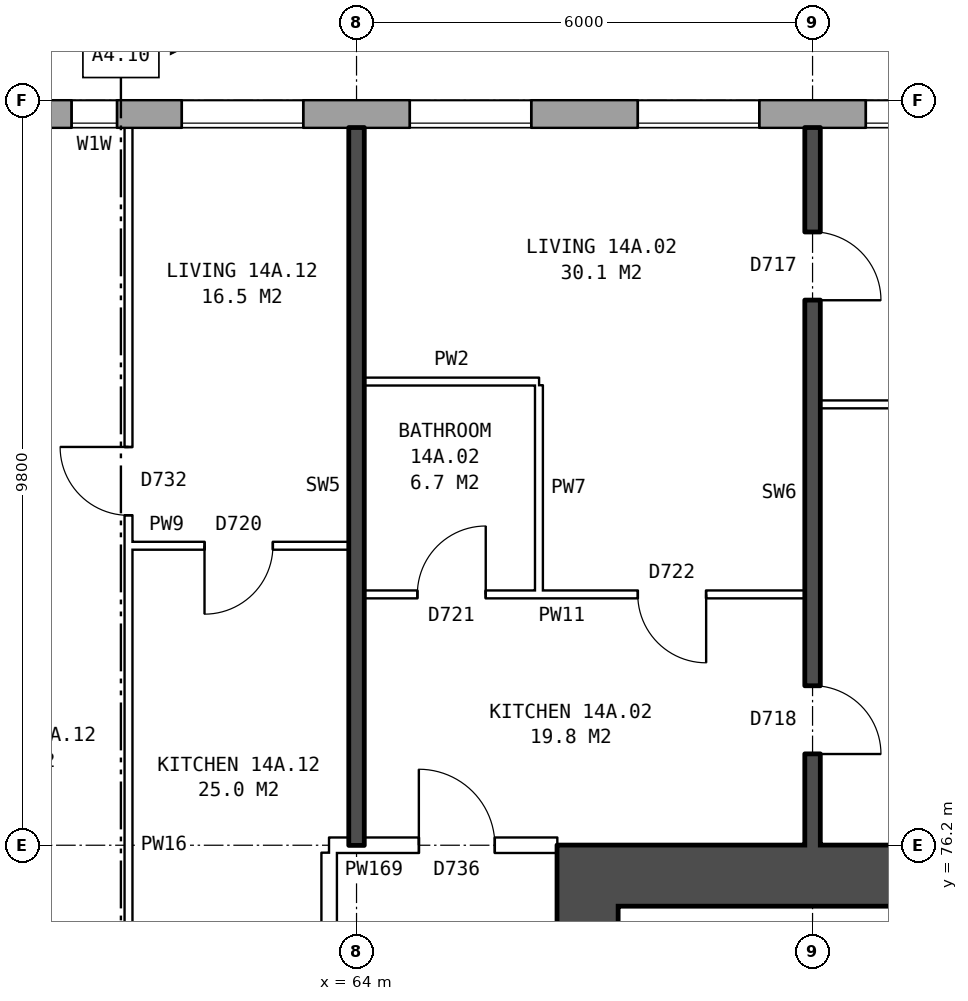
"""IFC4 building model, lengths in metres.
Left out: names, types, materials, properties, quantities, classifications, styles, units other than length and angle.
Written with IfcOpenShell. Run it as: python <this file> out.ifc"""

import sys

from ifc_helpers import new_model, si_unit, direction, frame, frame_2d, origin, place, context, subcontext, project, spatial, rectangle, extrude, element, fill, save


model = new_model("IFC4")
c1 = context("Model", 3, precision=1e-05, world=origin(), true_north=direction((0.0, 1.0)))
c2 = subcontext(c1, "Body", "Model", "MODEL_VIEW")
j1 = project(units=[si_unit("LENGTHUNIT", "METRE"), si_unit("PLANEANGLEUNIT", "RADIAN")], contexts=[c1])
p1 = place(None, origin())
s1 = spatial("IfcSite", under=j1, at=p1, CompositionType="ELEMENT")
p2 = place(p1, origin())
s2 = spatial("IfcBuilding", under=s1, at=p2, CompositionType="ELEMENT")
p3 = place(p2, frame((0.0, 0.0, 53.6)))
s3 = spatial("IfcBuildingStorey", under=s2, at=p3, CompositionType="ELEMENT", Elevation=53.6)
p4 = place(p3, frame((72.925, 85.82, 0.0), z_axis=(0.0, 0.0, 1.0), x_axis=(-1.0, 0.0, 0.0)))
e1 = element("IfcWall", 1, at=p4, inside=s3, PredefinedType="STANDARD", context=c2, shape_type="SweptSolid", body=[
    extrude(rectangle(XDim=48.351, YDim=0.36, at=frame_2d((24.175, 0.0))), origin(), (0.0, 0.0, 1.0), 2.85),
])
p5 = place(p4, frame((0.625, 0.0, 0.8)))
e2 = element("IfcOpeningElement", 2, at=p5, cuts=e1, PredefinedType="OPENING", context=c2, shape_type="SweptSolid", body=[
    extrude(rectangle(XDim=1.6, YDim=1.8, at=frame_2d((0.8, 0.9))), frame((0.0, 0.19, 0.0), z_axis=(0.0, -1.0, 0.0), x_axis=(1.0, 0.0, 0.0)), (0.0, 0.0, 1.0), 0.38),
])
p6 = place(p4, frame((3.625, 0.0, 0.8)))
e3 = element("IfcOpeningElement", 3, at=p6, cuts=e1, PredefinedType="OPENING", context=c2, shape_type="SweptSolid", body=[
    extrude(rectangle(XDim=1.6, YDim=1.8, at=frame_2d((0.8, 0.9))), frame((0.0, 0.19, 0.0), z_axis=(0.0, -1.0, 0.0), x_axis=(1.0, 0.0, 0.0)), (0.0, 0.0, 1.0), 0.38),
])
p7 = place(p4, frame((6.625, 0.0, 0.8)))
e4 = element("IfcOpeningElement", 4, at=p7, cuts=e1, PredefinedType="OPENING", context=c2, shape_type="SweptSolid", body=[
    extrude(rectangle(XDim=1.6, YDim=1.8, at=frame_2d((0.8, 0.9))), frame((0.0, 0.19, 0.0), z_axis=(0.0, -1.0, 0.0), x_axis=(1.0, 0.0, 0.0)), (0.0, 0.0, 1.0), 0.38),
])
p8 = place(p4, frame((9.625, 0.0, 0.8)))
e5 = element("IfcOpeningElement", 5, at=p8, cuts=e1, PredefinedType="OPENING", context=c2, shape_type="SweptSolid", body=[
    extrude(rectangle(XDim=1.6, YDim=1.8, at=frame_2d((0.8, 0.9))), frame((0.0, 0.19, 0.0), z_axis=(0.0, -1.0, 0.0), x_axis=(1.0, 0.0, 0.0)), (0.0, 0.0, 1.0), 0.38),
])
p9 = place(p4, frame((12.075, 0.0, 1.55)))
e6 = element("IfcOpeningElement", 6, at=p9, cuts=e1, PredefinedType="OPENING", context=c2, shape_type="SweptSolid", body=[
    extrude(rectangle(XDim=0.6, YDim=0.9, at=frame_2d((0.3, 0.45))), frame((0.0, 0.19, 0.0), z_axis=(0.0, -1.0, 0.0), x_axis=(1.0, 0.0, 0.0)), (0.0, 0.0, 1.0), 0.38),
])
p10 = place(p4, frame((15.625, 0.0, 0.8)))
e7 = element("IfcOpeningElement", 7, at=p10, cuts=e1, PredefinedType="OPENING", context=c2, shape_type="SweptSolid", body=[
    extrude(rectangle(XDim=1.6, YDim=1.8, at=frame_2d((0.8, 0.9))), frame((0.0, 0.19, 0.0), z_axis=(0.0, -1.0, 0.0), x_axis=(1.0, 0.0, 0.0)), (0.0, 0.0, 1.0), 0.38),
])
p11 = place(p4, frame((18.625, 0.0, 0.8)))
e8 = element("IfcOpeningElement", 8, at=p11, cuts=e1, PredefinedType="OPENING", context=c2, shape_type="SweptSolid", body=[
    extrude(rectangle(XDim=1.6, YDim=1.8, at=frame_2d((0.8, 0.9))), frame((0.0, 0.19, 0.0), z_axis=(0.0, -1.0, 0.0), x_axis=(1.0, 0.0, 0.0)), (0.0, 0.0, 1.0), 0.38),
])
p12 = place(p4, frame((21.625, 0.0, 0.8)))
e9 = element("IfcOpeningElement", 9, at=p12, cuts=e1, PredefinedType="OPENING", context=c2, shape_type="SweptSolid", body=[
    extrude(rectangle(XDim=1.6, YDim=1.8, at=frame_2d((0.8, 0.9))), frame((0.0, 0.19, 0.0), z_axis=(0.0, -1.0, 0.0), x_axis=(1.0, 0.0, 0.0)), (0.0, 0.0, 1.0), 0.38),
])
p13 = place(p4, frame((24.625, 0.0, 0.8)))
e10 = element("IfcOpeningElement", 10, at=p13, cuts=e1, PredefinedType="OPENING", context=c2, shape_type="SweptSolid", body=[
    extrude(rectangle(XDim=1.6, YDim=1.8, at=frame_2d((0.8, 0.9))), frame((0.0, 0.19, 0.0), z_axis=(0.0, -1.0, 0.0), x_axis=(1.0, 0.0, 0.0)), (0.0, 0.0, 1.0), 0.38),
])
p14 = place(p4, frame((27.625, 0.0, 0.8)))
e11 = element("IfcOpeningElement", 11, at=p14, cuts=e1, PredefinedType="OPENING", context=c2, shape_type="SweptSolid", body=[
    extrude(rectangle(XDim=1.6, YDim=1.8, at=frame_2d((0.8, 0.9))), frame((0.0, 0.19, 0.0), z_axis=(0.0, -1.0, 0.0), x_axis=(1.0, 0.0, 0.0)), (0.0, 0.0, 1.0), 0.38),
])
p15 = place(p4, frame((30.625, 0.0, 0.8)))
e12 = element("IfcOpeningElement", 12, at=p15, cuts=e1, PredefinedType="OPENING", context=c2, shape_type="SweptSolid", body=[
    extrude(rectangle(XDim=1.6, YDim=1.8, at=frame_2d((0.8, 0.9))), frame((0.0, 0.19, 0.0), z_axis=(0.0, -1.0, 0.0), x_axis=(1.0, 0.0, 0.0)), (0.0, 0.0, 1.0), 0.38),
])
p16 = place(p4, frame((33.125, 0.0, 0.25)))
e13 = element("IfcOpeningElement", 13, at=p16, cuts=e1, PredefinedType="OPENING", context=c2, shape_type="SweptSolid", body=[
    extrude(rectangle(XDim=0.8, YDim=1.5, at=frame_2d((0.4, 0.75))), frame((0.0, 0.19, 0.0), z_axis=(0.0, -1.0, 0.0), x_axis=(1.0, 0.0, 0.0)), (0.0, 0.0, 1.0), 0.38),
])
p17 = place(p4, frame((36.625, 0.0, 0.8)))
e14 = element("IfcOpeningElement", 14, at=p17, cuts=e1, PredefinedType="OPENING", context=c2, shape_type="SweptSolid", body=[
    extrude(rectangle(XDim=1.6, YDim=1.8, at=frame_2d((0.8, 0.9))), frame((0.0, 0.19, 0.0), z_axis=(0.0, -1.0, 0.0), x_axis=(1.0, 0.0, 0.0)), (0.0, 0.0, 1.0), 0.38),
])
p18 = place(p4, frame((39.625, 0.0, 0.8)))
e15 = element("IfcOpeningElement", 15, at=p18, cuts=e1, PredefinedType="OPENING", context=c2, shape_type="SweptSolid", body=[
    extrude(rectangle(XDim=1.6, YDim=1.8, at=frame_2d((0.8, 0.9))), frame((0.0, 0.19, 0.0), z_axis=(0.0, -1.0, 0.0), x_axis=(1.0, 0.0, 0.0)), (0.0, 0.0, 1.0), 0.38),
])
p19 = place(p4, frame((42.625, 0.0, 0.8)))
e16 = element("IfcOpeningElement", 16, at=p19, cuts=e1, PredefinedType="OPENING", context=c2, shape_type="SweptSolid", body=[
    extrude(rectangle(XDim=1.6, YDim=1.8, at=frame_2d((0.8, 0.9))), frame((0.0, 0.19, 0.0), z_axis=(0.0, -1.0, 0.0), x_axis=(1.0, 0.0, 0.0)), (0.0, 0.0, 1.0), 0.38),
])
p20 = place(p4, frame((45.625, 0.0, 0.8)))
e17 = element("IfcOpeningElement", 17, at=p20, cuts=e1, PredefinedType="OPENING", context=c2, shape_type="SweptSolid", body=[
    extrude(rectangle(XDim=1.6, YDim=1.8, at=frame_2d((0.8, 0.9))), frame((0.0, 0.19, 0.0), z_axis=(0.0, -1.0, 0.0), x_axis=(1.0, 0.0, 0.0)), (0.0, 0.0, 1.0), 0.38),
])
p21 = place(p4, frame((13.325, 0.0, 0.15)))
e18 = element("IfcOpeningElement", 18, at=p21, cuts=e1, PredefinedType="OPENING", context=c2, shape_type="SweptSolid", body=[
    extrude(rectangle(XDim=1.4, YDim=0.9, at=frame_2d((0.7, 0.45))), frame((0.0, 0.19, 0.0), z_axis=(0.0, -1.0, 0.0), x_axis=(1.0, 0.0, 0.0)), (0.0, 0.0, 1.0), 0.38),
])
p22 = place(p4, frame((34.225, 0.0, 0.25)))
e19 = element("IfcOpeningElement", 19, at=p22, cuts=e1, PredefinedType="OPENING", context=c2, shape_type="SweptSolid", body=[
    extrude(rectangle(XDim=0.6, YDim=0.9, at=frame_2d((0.3, 0.45))), frame((0.0, 0.19, 0.0), z_axis=(0.0, -1.0, 0.0), x_axis=(1.0, 0.0, 0.0)), (0.0, 0.0, 1.0), 0.38),
])
p23 = place(p3, frame((67.04, 64.6, 0.0), z_axis=(0.0, 0.0, 1.0), x_axis=(0.0, 1.0, 0.0)))
e20 = element("IfcWall", 20, at=p23, inside=s3, PredefinedType="SHEAR", context=c2, shape_type="SweptSolid", body=[
    extrude(rectangle(XDim=10.8, YDim=0.8, at=frame_2d((5.4, 0.0))), origin(), (0.0, 0.0, 1.0), 2.85),
])
p24 = place(p23, frame((0.525, 0.0, 0.0)))
e21 = element("IfcOpeningElement", 21, at=p24, cuts=e20, PredefinedType="OPENING", context=c2, shape_type="SweptSolid", body=[
    extrude(rectangle(XDim=1.1, YDim=2.1, at=frame_2d((0.55, 1.05))), frame((0.0, 0.41, 0.0), z_axis=(0.0, -1.0, 0.0), x_axis=(1.0, 0.0, 0.0)), (0.0, 0.0, 1.0), 0.82),
])
p25 = place(p23, frame((9.1, 0.0, 0.0)))
e22 = element("IfcOpeningElement", 22, at=p25, cuts=e20, PredefinedType="OPENING", context=c2, shape_type="SweptSolid", body=[
    extrude(rectangle(XDim=1.1, YDim=2.1, at=frame_2d((0.55, 1.05))), frame((0.0, 0.41, 0.0), z_axis=(0.0, -1.0, 0.0), x_axis=(1.0, 0.0, 0.0)), (0.0, 0.0, 1.0), 0.82),
])
p26 = place(p3, frame((66.64, 75.8, 0.0), z_axis=(0.0, 0.0, 1.0), x_axis=(1.0, 0.0, 0.0)))
e23 = element("IfcWall", 23, at=p26, inside=s3, PredefinedType="SHEAR", context=c2, shape_type="SweptSolid", body=[
    extrude(rectangle(XDim=9.0, YDim=0.8, at=frame_2d((4.5, 0.0))), origin(), (0.0, 0.0, 1.0), 2.85),
])
p27 = place(p3, frame((63.64, 63.9, 0.0), z_axis=(0.0, 0.0, 1.0), x_axis=(0.0, 1.0, 0.0)))
e24 = element("IfcWall", 24, at=p27, inside=s3, PredefinedType="PARTITIONING", context=c2, shape_type="SweptSolid", body=[
    extrude(rectangle(XDim=12.2, YDim=0.2, at=frame_2d((6.1, 0.0))), origin(), (0.0, 0.0, 1.0), 2.85),
])
p28 = place(p27, frame((5.1, 0.0, 0.0)))
e25 = element("IfcOpeningElement", 25, at=p28, cuts=e24, PredefinedType="OPENING", context=c2, shape_type="SweptSolid", body=[
    extrude(rectangle(XDim=2.0, YDim=2.1, at=frame_2d((1.0, 1.05))), frame((0.0, 0.11, 0.0), z_axis=(0.0, -1.0, 0.0), x_axis=(1.0, 0.0, 0.0)), (0.0, 0.0, 1.0), 0.22),
])
p29 = place(p3, frame((63.64, 76.2, 0.0), z_axis=(0.0, 0.0, 1.0), x_axis=(1.0, 0.0, 0.0)))
e26 = element("IfcWall", 26, at=p29, inside=s3, PredefinedType="PARTITIONING", context=c2, shape_type="SweptSolid", body=[
    extrude(rectangle(XDim=3.0, YDim=0.2, at=frame_2d((1.5, 0.0))), origin(), (0.0, 0.0, 1.0), 2.85),
])
p30 = place(p29, frame((1.18, 0.0, 0.0)))
e27 = element("IfcOpeningElement", 27, at=p30, cuts=e26, PredefinedType="OPENING", context=c2, shape_type="SweptSolid", body=[
    extrude(rectangle(XDim=1.0, YDim=2.1, at=frame_2d((0.5, 1.05))), frame((0.0, 0.11, 0.0), z_axis=(0.0, -1.0, 0.0), x_axis=(1.0, 0.0, 0.0)), (0.0, 0.0, 1.0), 0.22),
])
p31 = place(p3, frame((64.1, 79.5, 0.0), z_axis=(0.0, 0.0, 1.0), x_axis=(1.0, 0.0, 0.0)))
e28 = element("IfcWall", 28, at=p31, inside=s3, PredefinedType="PARTITIONING", context=c2, shape_type="SweptSolid", body=[
    extrude(rectangle(XDim=5.8, YDim=0.1, at=frame_2d((2.9, 0.0))), origin(), (0.0, 0.0, 1.0), 2.85),
])
p32 = place(p31, frame((3.6, 0.0, 0.0)))
e29 = element("IfcOpeningElement", 29, at=p32, cuts=e28, PredefinedType="OPENING", context=c2, shape_type="SweptSolid", body=[
    extrude(rectangle(XDim=0.9, YDim=2.1, at=frame_2d((0.45, 1.05))), frame((0.0, 0.06, 0.0), z_axis=(0.0, -1.0, 0.0), x_axis=(1.0, 0.0, 0.0)), (0.0, 0.0, 1.0), 0.12),
])
p33 = place(p31, frame((0.7, 0.0, 0.0)))
e30 = element("IfcOpeningElement", 30, at=p33, cuts=e28, PredefinedType="OPENING", context=c2, shape_type="SweptSolid", body=[
    extrude(rectangle(XDim=0.9, YDim=2.1, at=frame_2d((0.45, 1.05))), frame((0.0, 0.06, 0.0), z_axis=(0.0, -1.0, 0.0), x_axis=(1.0, 0.0, 0.0)), (0.0, 0.0, 1.0), 0.12),
])
p34 = place(p3, frame((61.0, 80.14, 0.0), z_axis=(0.0, 0.0, 1.0), x_axis=(1.0, 0.0, 0.0)))
e31 = element("IfcWall", 31, at=p34, inside=s3, PredefinedType="PARTITIONING", context=c2, shape_type="SweptSolid", body=[
    extrude(rectangle(XDim=2.9, YDim=0.1, at=frame_2d((1.45, 0.0))), origin(), (0.0, 0.0, 1.0), 2.85),
])
p35 = place(p34, frame((1.0, 0.0, 0.0)))
e32 = element("IfcOpeningElement", 32, at=p35, cuts=e31, PredefinedType="OPENING", context=c2, shape_type="SweptSolid", body=[
    extrude(rectangle(XDim=0.9, YDim=2.1, at=frame_2d((0.45, 1.05))), frame((0.0, 0.06, 0.0), z_axis=(0.0, -1.0, 0.0), x_axis=(1.0, 0.0, 0.0)), (0.0, 0.0, 1.0), 0.12),
])
p36 = place(p3, frame((70.1, 82.0, 0.0), z_axis=(0.0, 0.0, 1.0), x_axis=(1.0, 0.0, 0.0)))
e33 = element("IfcWall", 33, at=p36, inside=s3, PredefinedType="PARTITIONING", context=c2, shape_type="SweptSolid", body=[
    extrude(rectangle(XDim=5.54, YDim=0.1, at=frame_2d((2.77, 0.0))), origin(), (0.0, 0.0, 1.0), 2.85),
])
p37 = place(p3, frame((64.1, 82.3, 0.0), z_axis=(0.0, 0.0, 1.0), x_axis=(1.0, 0.0, 0.0)))
e34 = element("IfcWall", 34, at=p37, inside=s3, PredefinedType="PARTITIONING", context=c2, shape_type="SweptSolid", body=[
    extrude(rectangle(XDim=2.3, YDim=0.1, at=frame_2d((1.15, 0.0))), origin(), (0.0, 0.0, 1.0), 2.85),
])
p38 = place(p3, frame((61.0, 71.3, 0.0), z_axis=(0.0, 0.0, 1.0), x_axis=(0.0, 1.0, 0.0)))
e35 = element("IfcWall", 35, at=p38, inside=s3, PredefinedType="PARTITIONING", context=c2, shape_type="SweptSolid", body=[
    extrude(rectangle(XDim=14.34, YDim=0.1, at=frame_2d((7.17, 0.0))), origin(), (0.0, 0.0, 1.0), 2.85),
])
p39 = place(p38, frame((9.24, 0.0, 0.0)))
e36 = element("IfcOpeningElement", 36, at=p39, cuts=e35, PredefinedType="OPENING", context=c2, shape_type="SweptSolid", body=[
    extrude(rectangle(XDim=0.9, YDim=2.1, at=frame_2d((0.45, 1.05))), frame((0.0, 0.06, 0.0), z_axis=(0.0, -1.0, 0.0), x_axis=(1.0, 0.0, 0.0)), (0.0, 0.0, 1.0), 0.12),
])
p40 = place(p38, frame((0.9, 0.0, 0.0)))
e37 = element("IfcOpeningElement", 37, at=p40, cuts=e35, PredefinedType="OPENING", context=c2, shape_type="SweptSolid", body=[
    extrude(rectangle(XDim=0.9, YDim=2.1, at=frame_2d((0.45, 1.05))), frame((0.0, 0.06, 0.0), z_axis=(0.0, -1.0, 0.0), x_axis=(1.0, 0.0, 0.0)), (0.0, 0.0, 1.0), 0.12),
])
p41 = place(p3, frame((64.0, 76.2, 0.0), z_axis=(0.0, 0.0, 1.0), x_axis=(0.0, 1.0, 0.0)))
e38 = element("IfcWall", 38, at=p41, inside=s3, PredefinedType="SOLIDWALL", context=c2, shape_type="SweptSolid", body=[
    extrude(rectangle(XDim=9.44, YDim=0.2, at=frame_2d((4.72, 0.0))), origin(), (0.0, 0.0, 1.0), 2.85),
])
p42 = place(p3, frame((66.4, 79.55, 0.0), z_axis=(0.0, 0.0, 1.0), x_axis=(0.0, 1.0, 0.0)))
e39 = element("IfcWall", 39, at=p42, inside=s3, PredefinedType="PARTITIONING", context=c2, shape_type="SweptSolid", body=[
    extrude(rectangle(XDim=2.7, YDim=0.1, at=frame_2d((1.35, 0.0))), origin(), (0.0, 0.0, 1.0), 2.85),
])
p43 = place(p3, frame((70.0, 76.2, 0.0), z_axis=(0.0, 0.0, 1.0), x_axis=(0.0, 1.0, 0.0)))
e40 = element("IfcWall", 40, at=p43, inside=s3, PredefinedType="SOLIDWALL", context=c2, shape_type="SweptSolid", body=[
    extrude(rectangle(XDim=9.44, YDim=0.2, at=frame_2d((4.72, 0.0))), origin(), (0.0, 0.0, 1.0), 2.85),
])
p44 = place(p43, frame((7.17, 0.0, 0.0)))
e41 = element("IfcOpeningElement", 41, at=p44, cuts=e40, PredefinedType="OPENING", context=c2, shape_type="SweptSolid", body=[
    extrude(rectangle(XDim=0.9, YDim=2.1, at=frame_2d((0.45, 1.05))), frame((0.0, 0.11, 0.0), z_axis=(0.0, -1.0, 0.0), x_axis=(1.0, 0.0, 0.0)), (0.0, 0.0, 1.0), 0.22),
])
p45 = place(p43, frame((1.2, 0.0, 0.0)))
e42 = element("IfcOpeningElement", 42, at=p45, cuts=e40, PredefinedType="OPENING", context=c2, shape_type="SweptSolid", body=[
    extrude(rectangle(XDim=0.9, YDim=2.1, at=frame_2d((0.45, 1.05))), frame((0.0, 0.11, 0.0), z_axis=(0.0, -1.0, 0.0), x_axis=(1.0, 0.0, 0.0)), (0.0, 0.0, 1.0), 0.22),
])
p46 = place(p5, origin())
e43 = element("IfcWindow", 43, at=p46, inside=s3, PartitioningType="SINGLE_PANEL", PredefinedType="WINDOW", context=c2, shape_type="SweptSolid", body=[
    extrude(rectangle(XDim=1.6, YDim=1.8, at=frame_2d((0.8, 0.9))), frame((0.0, 0.15, 0.0), z_axis=(0.0, -1.0, 0.0), x_axis=(1.0, 0.0, 0.0)), (0.0, 0.0, 1.0), 0.06),
])
fill(e2, e43)
p47 = place(p6, origin())
e44 = element("IfcWindow", 44, at=p47, inside=s3, PartitioningType="SINGLE_PANEL", PredefinedType="WINDOW", context=c2, shape_type="SweptSolid", body=[
    extrude(rectangle(XDim=1.6, YDim=1.8, at=frame_2d((0.8, 0.9))), frame((0.0, 0.15, 0.0), z_axis=(0.0, -1.0, 0.0), x_axis=(1.0, 0.0, 0.0)), (0.0, 0.0, 1.0), 0.06),
])
fill(e3, e44)
p48 = place(p7, origin())
e45 = element("IfcWindow", 45, at=p48, inside=s3, PartitioningType="SINGLE_PANEL", PredefinedType="WINDOW", context=c2, shape_type="SweptSolid", body=[
    extrude(rectangle(XDim=1.6, YDim=1.8, at=frame_2d((0.8, 0.9))), frame((0.0, 0.15, 0.0), z_axis=(0.0, -1.0, 0.0), x_axis=(1.0, 0.0, 0.0)), (0.0, 0.0, 1.0), 0.06),
])
fill(e4, e45)
p49 = place(p8, origin())
e46 = element("IfcWindow", 46, at=p49, inside=s3, PartitioningType="SINGLE_PANEL", PredefinedType="WINDOW", context=c2, shape_type="SweptSolid", body=[
    extrude(rectangle(XDim=1.6, YDim=1.8, at=frame_2d((0.8, 0.9))), frame((0.0, 0.15, 0.0), z_axis=(0.0, -1.0, 0.0), x_axis=(1.0, 0.0, 0.0)), (0.0, 0.0, 1.0), 0.06),
])
fill(e5, e46)
p50 = place(p9, origin())
e47 = element("IfcWindow", 47, at=p50, inside=s3, PartitioningType="SINGLE_PANEL", PredefinedType="WINDOW", context=c2, shape_type="SweptSolid", body=[
    extrude(rectangle(XDim=0.6, YDim=0.9, at=frame_2d((0.3, 0.45))), frame((0.0, 0.15, 0.0), z_axis=(0.0, -1.0, 0.0), x_axis=(1.0, 0.0, 0.0)), (0.0, 0.0, 1.0), 0.06),
])
fill(e6, e47)
p51 = place(p44, frame((0.9, 0.0, 0.0), z_axis=(0.0, 0.0, 1.0), x_axis=(-1.0, 0.0, 0.0)))
e48 = element("IfcDoor", 48, at=p51, inside=s3, OperationType="SINGLE_SWING_RIGHT", PredefinedType="DOOR", context=c2, shape_type="SweptSolid", body=[
    extrude(rectangle(XDim=0.9, YDim=2.1, at=frame_2d((0.45, 1.05))), frame((0.0, 0.025, 0.0), z_axis=(0.0, -1.0, 0.0), x_axis=(1.0, 0.0, 0.0)), (0.0, 0.0, 1.0), 0.05),
])
fill(e41, e48)
p52 = place(p45, frame((0.9, 0.0, 0.0), z_axis=(0.0, 0.0, 1.0), x_axis=(-1.0, 0.0, 0.0)))
e49 = element("IfcDoor", 49, at=p52, inside=s3, OperationType="SINGLE_SWING_RIGHT", PredefinedType="DOOR", context=c2, shape_type="SweptSolid", body=[
    extrude(rectangle(XDim=0.9, YDim=2.1, at=frame_2d((0.45, 1.05))), frame((0.0, 0.025, 0.0), z_axis=(0.0, -1.0, 0.0), x_axis=(1.0, 0.0, 0.0)), (0.0, 0.0, 1.0), 0.05),
])
fill(e42, e49)
p53 = place(p30, origin())
e50 = element("IfcDoor", 50, at=p53, inside=s3, OperationType="SINGLE_SWING_LEFT", PredefinedType="DOOR", context=c2, shape_type="SweptSolid", body=[
    extrude(rectangle(XDim=1.0, YDim=2.1, at=frame_2d((0.5, 1.05))), frame((0.0, 0.025, 0.0), z_axis=(0.0, -1.0, 0.0), x_axis=(1.0, 0.0, 0.0)), (0.0, 0.0, 1.0), 0.05),
])
fill(e27, e50)
p54 = place(p32, frame((0.9, 0.0, 0.0), z_axis=(0.0, 0.0, 1.0), x_axis=(-1.0, 0.0, 0.0)))
e51 = element("IfcDoor", 51, at=p54, inside=s3, OperationType="SINGLE_SWING_LEFT", PredefinedType="DOOR", context=c2, shape_type="SweptSolid", body=[
    extrude(rectangle(XDim=0.9, YDim=2.1, at=frame_2d((0.45, 1.05))), frame((0.0, 0.025, 0.0), z_axis=(0.0, -1.0, 0.0), x_axis=(1.0, 0.0, 0.0)), (0.0, 0.0, 1.0), 0.05),
])
fill(e29, e51)
p55 = place(p33, origin())
e52 = element("IfcDoor", 52, at=p55, inside=s3, OperationType="SINGLE_SWING_RIGHT", PredefinedType="DOOR", context=c2, shape_type="SweptSolid", body=[
    extrude(rectangle(XDim=0.9, YDim=2.1, at=frame_2d((0.45, 1.05))), frame((0.0, 0.025, 0.0), z_axis=(0.0, -1.0, 0.0), x_axis=(1.0, 0.0, 0.0)), (0.0, 0.0, 1.0), 0.05),
])
fill(e30, e52)
p56 = place(p39, origin())
e53 = element("IfcDoor", 53, at=p56, inside=s3, OperationType="SINGLE_SWING_RIGHT", PredefinedType="DOOR", context=c2, shape_type="SweptSolid", body=[
    extrude(rectangle(XDim=0.9, YDim=2.1, at=frame_2d((0.45, 1.05))), frame((0.0, 0.025, 0.0), z_axis=(0.0, -1.0, 0.0), x_axis=(1.0, 0.0, 0.0)), (0.0, 0.0, 1.0), 0.05),
])
fill(e36, e53)
p57 = place(p35, frame((0.9, 0.0, 0.0), z_axis=(0.0, 0.0, 1.0), x_axis=(-1.0, 0.0, 0.0)))
e54 = element("IfcDoor", 54, at=p57, inside=s3, OperationType="SINGLE_SWING_RIGHT", PredefinedType="DOOR", context=c2, shape_type="SweptSolid", body=[
    extrude(rectangle(XDim=0.9, YDim=2.1, at=frame_2d((0.45, 1.05))), frame((0.0, 0.025, 0.0), z_axis=(0.0, -1.0, 0.0), x_axis=(1.0, 0.0, 0.0)), (0.0, 0.0, 1.0), 0.05),
])
fill(e32, e54)
save(model, sys.argv[1])
